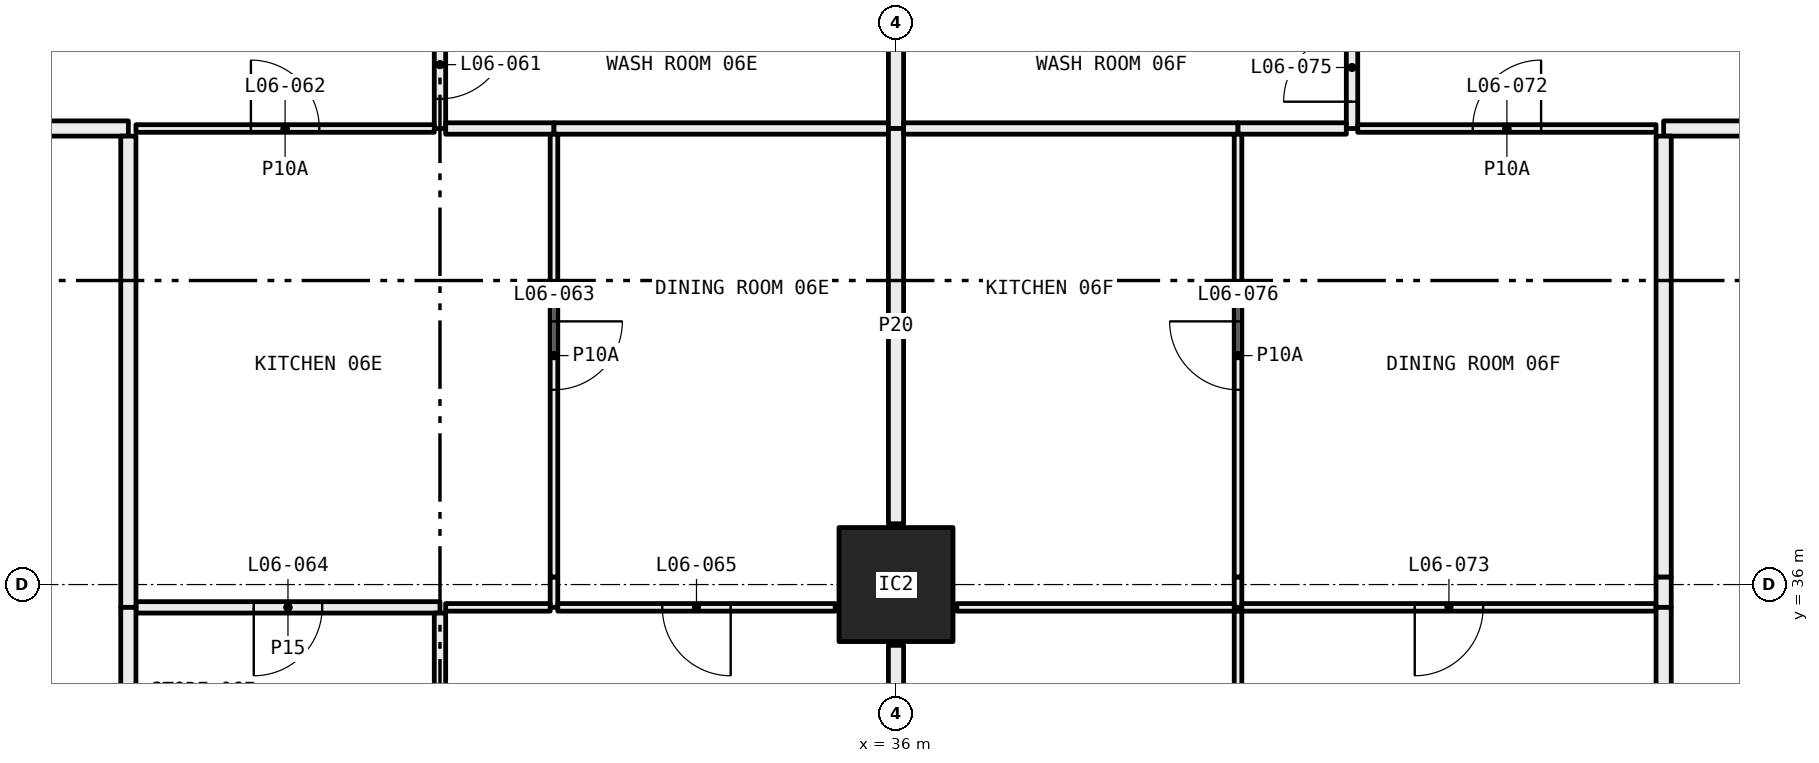
"""IFC4 building model, lengths in metres.
Left out: names, types, materials, properties, quantities, classifications, styles, units other than length and angle.
Written with IfcOpenShell. Run it as: python <this file> out.ifc"""

import sys

from ifc_helpers import new_model, si_unit, direction, frame, frame_2d, origin, origin_2d, place, context, subcontext, project, spatial, rectangle, hollow_rectangle, extrude, element, fill, save


model = new_model("IFC4")
c1 = context("Model", 3, precision=1e-05, world=origin(), true_north=direction((0.0, 1.0)))
c2 = subcontext(c1, "Body", "Model", "MODEL_VIEW")
j1 = project(units=[si_unit("LENGTHUNIT", "METRE"), si_unit("PLANEANGLEUNIT", "RADIAN")], contexts=[c1])
p1 = place(None, origin())
s1 = spatial("IfcSite", under=j1, at=p1, CompositionType="ELEMENT")
p2 = place(p1, origin())
s2 = spatial("IfcBuilding", under=s1, at=p2, CompositionType="ELEMENT")
p3 = place(p2, frame((0.0, 0.0, 33.45)))
s3 = spatial("IfcBuildingStorey", under=s2, at=p3, CompositionType="ELEMENT", Elevation=33.45)
p4 = place(p3, frame((36.0, 36.0, 0.0), z_axis=(0.0, 0.0, 1.0), x_axis=(1.0, 0.0, 0.0)))
e1 = element("IfcColumn", 1, at=p4, inside=s3, PredefinedType="COLUMN", context=c2, shape_type="SweptSolid", body=[
    extrude(hollow_rectangle(XDim=1.5, YDim=1.5, WallThickness=0.065, at=origin_2d()), origin(), (0.0, 0.0, 1.0), 3.05),
])
p5 = place(p3, frame((30.0, 42.0, 0.0), z_axis=(0.0, 0.0, 1.0), x_axis=(0.0, 1.0, 0.0)))
e2 = element("IfcWall", 2, at=p5, inside=s3, PredefinedType="PARTITIONING", context=c2, shape_type="SweptSolid", body=[
    extrude(rectangle(XDim=1.68, YDim=0.15, at=frame_2d((0.84, 0.0))), origin(), (0.0, 0.0, 1.0), 3.05),
])
p6 = place(p5, frame((0.39, 0.0, 0.0)))
e3 = element("IfcOpeningElement", 3, at=p6, cuts=e2, PredefinedType="OPENING", context=c2, shape_type="SweptSolid", body=[
    extrude(rectangle(XDim=0.9, YDim=2.1, at=frame_2d((0.45, 1.05))), frame((0.0, 0.085, 0.0), z_axis=(0.0, -1.0, 0.0), x_axis=(1.0, 0.0, 0.0)), (0.0, 0.0, 1.0), 0.17),
])
p7 = place(p3, frame((26.0, 42.0, 0.0), z_axis=(0.0, 0.0, 1.0), x_axis=(1.0, 0.0, 0.0)))
e4 = element("IfcWall", 4, at=p7, inside=s3, PredefinedType="PARTITIONING", context=c2, shape_type="SweptSolid", body=[
    extrude(rectangle(XDim=3.925, YDim=0.1, at=frame_2d((1.962, 0.0))), origin(), (0.0, 0.0, 1.0), 3.05),
])
p8 = place(p7, frame((1.512, 0.0, 0.0)))
e5 = element("IfcOpeningElement", 5, at=p8, cuts=e4, PredefinedType="OPENING", context=c2, shape_type="SweptSolid", body=[
    extrude(rectangle(XDim=0.9, YDim=2.1, at=frame_2d((0.45, 1.05))), frame((0.0, 0.06, 0.0), z_axis=(0.0, -1.0, 0.0), x_axis=(1.0, 0.0, 0.0)), (0.0, 0.0, 1.0), 0.12),
])
p9 = place(p3, frame((24.0, 42.0, 0.0), z_axis=(0.0, 0.0, 1.0), x_axis=(1.0, 0.0, 0.0)))
e6 = element("IfcWall", 6, at=p9, inside=s3, PredefinedType="PARTITIONING", context=c2, shape_type="SweptSolid", body=[
    extrude(rectangle(XDim=1.9, YDim=0.2, at=frame_2d((0.95, 0.0))), origin(), (0.0, 0.0, 1.0), 3.05),
])
p10 = place(p3, frame((30.075, 42.0, 0.0), z_axis=(0.0, 0.0, 1.0), x_axis=(1.0, 0.0, 0.0)))
e7 = element("IfcWall", 7, at=p10, inside=s3, PredefinedType="PARTITIONING", context=c2, shape_type="SweptSolid", body=[
    extrude(rectangle(XDim=1.425, YDim=0.15, at=frame_2d((0.712, 0.0))), origin(), (0.0, 0.0, 1.0), 3.05),
])
p11 = place(p3, frame((31.5, 42.0, 0.0), z_axis=(0.0, 0.0, 1.0), x_axis=(1.0, 0.0, 0.0)))
e8 = element("IfcWall", 8, at=p11, inside=s3, PredefinedType="PARTITIONING", context=c2, shape_type="SweptSolid", body=[
    extrude(rectangle(XDim=4.4, YDim=0.15, at=frame_2d((2.2, 0.0))), origin(), (0.0, 0.0, 1.0), 3.05),
])
p12 = place(p3, frame((36.0, 42.0, 0.0), z_axis=(0.0, 0.0, 1.0), x_axis=(0.0, 1.0, 0.0)))
e9 = element("IfcWall", 9, at=p12, inside=s3, PredefinedType="PARTITIONING", context=c2, shape_type="SweptSolid", body=[
    extrude(rectangle(XDim=1.68, YDim=0.2, at=frame_2d((0.84, 0.0))), origin(), (0.0, 0.0, 1.0), 2.45),
])
p13 = place(p3, frame((31.5, 35.7, 0.0), z_axis=(0.0, 0.0, 1.0), x_axis=(0.0, 1.0, 0.0)))
e10 = element("IfcWall", 10, at=p13, inside=s3, PredefinedType="PARTITIONING", context=c2, shape_type="SweptSolid", body=[
    extrude(rectangle(XDim=0.4, YDim=0.1, at=frame_2d((0.2, 0.0))), origin(), (0.0, 0.0, 1.0), 2.45),
])
p14 = place(p3, frame((31.5, 36.1, 0.0), z_axis=(0.0, 0.0, 1.0), x_axis=(0.0, 1.0, 0.0)))
e11 = element("IfcWall", 11, at=p14, inside=s3, PredefinedType="PARTITIONING", context=c2, shape_type="SweptSolid", body=[
    extrude(rectangle(XDim=5.825, YDim=0.1, at=frame_2d((2.913, 0.0))), origin(), (0.0, 0.0, 1.0), 3.05),
])
p15 = place(p14, frame((2.462, 0.0, 0.0)))
e12 = element("IfcOpeningElement", 12, at=p15, cuts=e11, PredefinedType="OPENING", context=c2, shape_type="SweptSolid", body=[
    extrude(rectangle(XDim=0.9, YDim=2.1, at=frame_2d((0.45, 1.05))), frame((0.0, 0.06, 0.0), z_axis=(0.0, -1.0, 0.0), x_axis=(1.0, 0.0, 0.0)), (0.0, 0.0, 1.0), 0.12),
])
p16 = place(p3, frame((26.0, 35.7, 0.0), z_axis=(0.0, 0.0, 1.0), x_axis=(1.0, 0.0, 0.0)))
e13 = element("IfcWall", 13, at=p16, inside=s3, PredefinedType="PARTITIONING", context=c2, shape_type="SweptSolid", body=[
    extrude(rectangle(XDim=4.0, YDim=0.15, at=frame_2d((2.0, 0.0))), origin(), (0.0, 0.0, 1.0), 3.05),
])
p17 = place(p16, frame((1.55, 0.0, 0.0)))
e14 = element("IfcOpeningElement", 14, at=p17, cuts=e13, PredefinedType="OPENING", context=c2, shape_type="SweptSolid", body=[
    extrude(rectangle(XDim=0.9, YDim=2.1, at=frame_2d((0.45, 1.05))), frame((0.0, 0.085, 0.0), z_axis=(0.0, -1.0, 0.0), x_axis=(1.0, 0.0, 0.0)), (0.0, 0.0, 1.0), 0.17),
])
p18 = place(p3, frame((30.075, 35.7, 0.0), z_axis=(0.0, 0.0, 1.0), x_axis=(1.0, 0.0, 0.0)))
e15 = element("IfcWall", 15, at=p18, inside=s3, PredefinedType="PARTITIONING", context=c2, shape_type="SweptSolid", body=[
    extrude(rectangle(XDim=1.375, YDim=0.1, at=frame_2d((0.688, 0.0))), origin(), (0.0, 0.0, 1.0), 3.05),
])
p19 = place(p3, frame((25.9, 41.9, 0.0), z_axis=(0.0, 0.0, 1.0), x_axis=(0.0, -1.0, 0.0)))
e16 = element("IfcWall", 16, at=p19, inside=s3, PredefinedType="PARTITIONING", context=c2, shape_type="SweptSolid", body=[
    extrude(rectangle(XDim=6.2, YDim=0.2, at=frame_2d((3.1, 0.0))), origin(), (0.0, 0.0, 1.0), 2.45),
])
p20 = place(p3, frame((31.55, 35.7, 0.0), z_axis=(0.0, 0.0, 1.0), x_axis=(1.0, 0.0, 0.0)))
e17 = element("IfcWall", 17, at=p20, inside=s3, PredefinedType="PARTITIONING", context=c2, shape_type="SweptSolid", body=[
    extrude(rectangle(XDim=3.65, YDim=0.1, at=frame_2d((1.825, 0.0))), origin(), (0.0, 0.0, 1.0), 3.05),
])
p21 = place(p20, frame((1.375, 0.0, 0.0)))
e18 = element("IfcOpeningElement", 18, at=p21, cuts=e17, PredefinedType="OPENING", context=c2, shape_type="SweptSolid", body=[
    extrude(rectangle(XDim=0.9, YDim=2.1, at=frame_2d((0.45, 1.05))), frame((0.0, 0.06, 0.0), z_axis=(0.0, -1.0, 0.0), x_axis=(1.0, 0.0, 0.0)), (0.0, 0.0, 1.0), 0.12),
])
p22 = place(p3, frame((36.0, 36.8, 0.0), z_axis=(0.0, 0.0, 1.0), x_axis=(0.0, 1.0, 0.0)))
e19 = element("IfcWall", 19, at=p22, inside=s3, PredefinedType="PARTITIONING", context=c2, shape_type="SweptSolid", body=[
    extrude(rectangle(XDim=5.2, YDim=0.2, at=frame_2d((2.6, 0.0))), origin(), (0.0, 0.0, 1.0), 2.45),
])
p23 = place(p3, frame((30.0, 33.675, 0.0), z_axis=(0.0, 0.0, 1.0), x_axis=(0.0, 1.0, 0.0)))
e20 = element("IfcWall", 20, at=p23, inside=s3, PredefinedType="PARTITIONING", context=c2, shape_type="SweptSolid", body=[
    extrude(rectangle(XDim=1.95, YDim=0.15, at=frame_2d((0.975, 0.0))), origin(), (0.0, 0.0, 1.0), 3.05),
])
p24 = place(p3, frame((25.9, 35.7, 0.0), z_axis=(0.0, 0.0, 1.0), x_axis=(0.0, -1.0, 0.0)))
e21 = element("IfcWall", 21, at=p24, inside=s3, PredefinedType="PARTITIONING", context=c2, shape_type="SweptSolid", body=[
    extrude(rectangle(XDim=2.1, YDim=0.2, at=frame_2d((1.05, 0.0))), origin(), (0.0, 0.0, 1.0), 3.05),
])
p25 = place(p3, frame((36.0, 31.2, 0.0), z_axis=(0.0, 0.0, 1.0), x_axis=(0.0, 1.0, 0.0)))
e22 = element("IfcWall", 22, at=p25, inside=s3, PredefinedType="PARTITIONING", context=c2, shape_type="SweptSolid", body=[
    extrude(rectangle(XDim=4.0, YDim=0.2, at=frame_2d((2.0, 0.0))), origin(), (0.0, 0.0, 1.0), 2.45),
])
p26 = place(p3, frame((42.0, 42.0, 0.0), z_axis=(0.0, 0.0, 1.0), x_axis=(0.0, 1.0, 0.0)))
e23 = element("IfcWall", 23, at=p26, inside=s3, PredefinedType="PARTITIONING", context=c2, shape_type="SweptSolid", body=[
    extrude(rectangle(XDim=1.605, YDim=0.15, at=frame_2d((0.802, 0.0))), origin(), (0.0, 0.0, 1.0), 3.05),
])
p27 = place(p26, frame((0.353, 0.0, 0.0)))
e24 = element("IfcOpeningElement", 24, at=p27, cuts=e23, PredefinedType="OPENING", context=c2, shape_type="SweptSolid", body=[
    extrude(rectangle(XDim=0.9, YDim=2.1, at=frame_2d((0.45, 1.05))), frame((0.0, 0.085, 0.0), z_axis=(0.0, -1.0, 0.0), x_axis=(1.0, 0.0, 0.0)), (0.0, 0.0, 1.0), 0.17),
])
p28 = place(p3, frame((36.1, 42.0, 0.0), z_axis=(0.0, 0.0, 1.0), x_axis=(1.0, 0.0, 0.0)))
e25 = element("IfcWall", 25, at=p28, inside=s3, PredefinedType="PARTITIONING", context=c2, shape_type="SweptSolid", body=[
    extrude(rectangle(XDim=4.4, YDim=0.15, at=frame_2d((2.2, 0.0))), origin(), (0.0, 0.0, 1.0), 3.05),
])
p29 = place(p3, frame((40.5, 42.0, 0.0), z_axis=(0.0, 0.0, 1.0), x_axis=(1.0, 0.0, 0.0)))
e26 = element("IfcWall", 26, at=p29, inside=s3, PredefinedType="PARTITIONING", context=c2, shape_type="SweptSolid", body=[
    extrude(rectangle(XDim=1.425, YDim=0.15, at=frame_2d((0.712, 0.0))), origin(), (0.0, 0.0, 1.0), 3.05),
])
p30 = place(p3, frame((42.075, 42.0, 0.0), z_axis=(0.0, 0.0, 1.0), x_axis=(1.0, 0.0, 0.0)))
e27 = element("IfcWall", 27, at=p30, inside=s3, PredefinedType="PARTITIONING", context=c2, shape_type="SweptSolid", body=[
    extrude(rectangle(XDim=3.925, YDim=0.1, at=frame_2d((1.962, 0.0))), origin(), (0.0, 0.0, 1.0), 3.05),
])
p31 = place(p30, frame((1.512, 0.0, 0.0)))
e28 = element("IfcOpeningElement", 28, at=p31, cuts=e27, PredefinedType="OPENING", context=c2, shape_type="SweptSolid", body=[
    extrude(rectangle(XDim=0.9, YDim=2.1, at=frame_2d((0.45, 1.05))), frame((0.0, 0.06, 0.0), z_axis=(0.0, -1.0, 0.0), x_axis=(1.0, 0.0, 0.0)), (0.0, 0.0, 1.0), 0.12),
])
p32 = place(p3, frame((46.1, 42.0, 0.0), z_axis=(0.0, 0.0, 1.0), x_axis=(1.0, 0.0, 0.0)))
e29 = element("IfcWall", 29, at=p32, inside=s3, PredefinedType="PARTITIONING", context=c2, shape_type="SweptSolid", body=[
    extrude(rectangle(XDim=1.9, YDim=0.2, at=frame_2d((0.95, 0.0))), origin(), (0.0, 0.0, 1.0), 3.05),
])
p33 = place(p3, frame((40.5, 35.7, 0.0), z_axis=(0.0, 0.0, 1.0), x_axis=(0.0, 1.0, 0.0)))
e30 = element("IfcWall", 30, at=p33, inside=s3, PredefinedType="PARTITIONING", context=c2, shape_type="SweptSolid", body=[
    extrude(rectangle(XDim=0.4, YDim=0.1, at=frame_2d((0.2, 0.0))), origin(), (0.0, 0.0, 1.0), 2.45),
])
p34 = place(p3, frame((40.5, 36.1, 0.0), z_axis=(0.0, 0.0, 1.0), x_axis=(0.0, 1.0, 0.0)))
e31 = element("IfcWall", 31, at=p34, inside=s3, PredefinedType="PARTITIONING", context=c2, shape_type="SweptSolid", body=[
    extrude(rectangle(XDim=5.825, YDim=0.1, at=frame_2d((2.913, 0.0))), origin(), (0.0, 0.0, 1.0), 3.05),
])
p35 = place(p34, frame((2.462, 0.0, 0.0)))
e32 = element("IfcOpeningElement", 32, at=p35, cuts=e31, PredefinedType="OPENING", context=c2, shape_type="SweptSolid", body=[
    extrude(rectangle(XDim=0.9, YDim=2.1, at=frame_2d((0.45, 1.05))), frame((0.0, 0.06, 0.0), z_axis=(0.0, -1.0, 0.0), x_axis=(1.0, 0.0, 0.0)), (0.0, 0.0, 1.0), 0.12),
])
p36 = place(p3, frame((36.8, 35.7, 0.0), z_axis=(0.0, 0.0, 1.0), x_axis=(1.0, 0.0, 0.0)))
e33 = element("IfcWall", 33, at=p36, inside=s3, PredefinedType="PARTITIONING", context=c2, shape_type="SweptSolid", body=[
    extrude(rectangle(XDim=3.65, YDim=0.1, at=frame_2d((1.825, 0.0))), origin(), (0.0, 0.0, 1.0), 3.05),
])
p37 = place(p3, frame((40.55, 35.7, 0.0), z_axis=(0.0, 0.0, 1.0), x_axis=(1.0, 0.0, 0.0)))
e34 = element("IfcWall", 34, at=p37, inside=s3, PredefinedType="PARTITIONING", context=c2, shape_type="SweptSolid", body=[
    extrude(rectangle(XDim=5.45, YDim=0.1, at=frame_2d((2.725, 0.0))), origin(), (0.0, 0.0, 1.0), 3.05),
])
p38 = place(p37, frame((2.275, 0.0, 0.0)))
e35 = element("IfcOpeningElement", 35, at=p38, cuts=e34, PredefinedType="OPENING", context=c2, shape_type="SweptSolid", body=[
    extrude(rectangle(XDim=0.9, YDim=2.1, at=frame_2d((0.45, 1.05))), frame((0.0, 0.06, 0.0), z_axis=(0.0, -1.0, 0.0), x_axis=(1.0, 0.0, 0.0)), (0.0, 0.0, 1.0), 0.12),
])
p39 = place(p3, frame((46.1, 35.7, 0.0), z_axis=(0.0, 0.0, 1.0), x_axis=(0.0, 1.0, 0.0)))
e36 = element("IfcWall", 36, at=p39, inside=s3, PredefinedType="PARTITIONING", context=c2, shape_type="SweptSolid", body=[
    extrude(rectangle(XDim=0.4, YDim=0.2, at=frame_2d((0.2, 0.0))), origin(), (0.0, 0.0, 1.0), 2.45),
])
p40 = place(p3, frame((46.1, 36.1, 0.0), z_axis=(0.0, 0.0, 1.0), x_axis=(0.0, 1.0, 0.0)))
e37 = element("IfcWall", 37, at=p40, inside=s3, PredefinedType="PARTITIONING", context=c2, shape_type="SweptSolid", body=[
    extrude(rectangle(XDim=5.8, YDim=0.2, at=frame_2d((2.9, 0.0))), origin(), (0.0, 0.0, 1.0), 3.05),
])
p41 = place(p3, frame((40.5, 31.3, 0.0), z_axis=(0.0, 0.0, 1.0), x_axis=(0.0, 1.0, 0.0)))
e38 = element("IfcWall", 38, at=p41, inside=s3, PredefinedType="PARTITIONING", context=c2, shape_type="SweptSolid", body=[
    extrude(rectangle(XDim=4.35, YDim=0.1, at=frame_2d((2.175, 0.0))), origin(), (0.0, 0.0, 1.0), 3.05),
])
p42 = place(p41, frame((1.725, 0.0, 0.0)))
e39 = element("IfcOpeningElement", 39, at=p42, cuts=e38, PredefinedType="OPENING", context=c2, shape_type="SweptSolid", body=[
    extrude(rectangle(XDim=0.9, YDim=2.1, at=frame_2d((0.45, 1.05))), frame((0.0, 0.06, 0.0), z_axis=(0.0, -1.0, 0.0), x_axis=(1.0, 0.0, 0.0)), (0.0, 0.0, 1.0), 0.12),
])
p43 = place(p3, frame((46.1, 31.3, 0.0), z_axis=(0.0, 0.0, 1.0), x_axis=(0.0, 1.0, 0.0)))
e40 = element("IfcWall", 40, at=p43, inside=s3, PredefinedType="PARTITIONING", context=c2, shape_type="SweptSolid", body=[
    extrude(rectangle(XDim=4.4, YDim=0.2, at=frame_2d((2.2, 0.0))), origin(), (0.0, 0.0, 1.0), 3.05),
])
p44 = place(p6, frame((0.9, 0.0, 0.0), x_axis=(-1.0, 0.0, 0.0)))
e41 = element("IfcDoor", 41, at=p44, inside=s3, OperationType="SINGLE_SWING_RIGHT", PredefinedType="DOOR", context=c2, shape_type="SweptSolid", body=[
    extrude(rectangle(XDim=0.9, YDim=2.1, at=frame_2d((0.45, 1.05))), frame((0.0, 0.025, 0.0), z_axis=(0.0, -1.0, 0.0), x_axis=(1.0, 0.0, 0.0)), (0.0, 0.0, 1.0), 0.05),
])
fill(e3, e41)
p45 = place(p8, origin())
e42 = element("IfcDoor", 42, at=p45, inside=s3, OperationType="SINGLE_SWING_RIGHT", PredefinedType="DOOR", context=c2, shape_type="SweptSolid", body=[
    extrude(rectangle(XDim=0.9, YDim=2.1, at=frame_2d((0.45, 1.05))), frame((0.0, 0.025, 0.0), z_axis=(0.0, -1.0, 0.0), x_axis=(1.0, 0.0, 0.0)), (0.0, 0.0, 1.0), 0.05),
])
fill(e5, e42)
p46 = place(p15, frame((0.9, 0.0, 0.0), x_axis=(-1.0, 0.0, 0.0)))
e43 = element("IfcDoor", 43, at=p46, inside=s3, OperationType="SINGLE_SWING_RIGHT", PredefinedType="DOOR", context=c2, shape_type="SweptSolid", body=[
    extrude(rectangle(XDim=0.9, YDim=2.1, at=frame_2d((0.45, 1.05))), frame((0.0, 0.025, 0.0), z_axis=(0.0, -1.0, 0.0), x_axis=(1.0, 0.0, 0.0)), (0.0, 0.0, 1.0), 0.05),
])
fill(e12, e43)
p47 = place(p17, frame((0.9, 0.0, 0.0), x_axis=(-1.0, 0.0, 0.0)))
e44 = element("IfcDoor", 44, at=p47, inside=s3, OperationType="SINGLE_SWING_LEFT", PredefinedType="DOOR", context=c2, shape_type="SweptSolid", body=[
    extrude(rectangle(XDim=0.9, YDim=2.1, at=frame_2d((0.45, 1.05))), frame((0.0, 0.025, 0.0), z_axis=(0.0, -1.0, 0.0), x_axis=(1.0, 0.0, 0.0)), (0.0, 0.0, 1.0), 0.05),
])
fill(e14, e44)
p48 = place(p21, frame((0.9, 0.0, 0.0), x_axis=(-1.0, 0.0, 0.0)))
e45 = element("IfcDoor", 45, at=p48, inside=s3, OperationType="SINGLE_SWING_RIGHT", PredefinedType="DOOR", context=c2, shape_type="SweptSolid", body=[
    extrude(rectangle(XDim=0.9, YDim=2.1, at=frame_2d((0.45, 1.05))), frame((0.0, 0.025, 0.0), z_axis=(0.0, -1.0, 0.0), x_axis=(1.0, 0.0, 0.0)), (0.0, 0.0, 1.0), 0.05),
])
fill(e18, e45)
p49 = place(p31, origin())
e46 = element("IfcDoor", 46, at=p49, inside=s3, OperationType="SINGLE_SWING_LEFT", PredefinedType="DOOR", context=c2, shape_type="SweptSolid", body=[
    extrude(rectangle(XDim=0.9, YDim=2.1, at=frame_2d((0.45, 1.05))), frame((0.0, 0.025, 0.0), z_axis=(0.0, -1.0, 0.0), x_axis=(1.0, 0.0, 0.0)), (0.0, 0.0, 1.0), 0.05),
])
fill(e28, e46)
p50 = place(p38, frame((0.9, 0.0, 0.0), x_axis=(-1.0, 0.0, 0.0)))
e47 = element("IfcDoor", 47, at=p50, inside=s3, OperationType="SINGLE_SWING_LEFT", PredefinedType="DOOR", context=c2, shape_type="SweptSolid", body=[
    extrude(rectangle(XDim=0.9, YDim=2.1, at=frame_2d((0.45, 1.05))), frame((0.0, 0.025, 0.0), z_axis=(0.0, -1.0, 0.0), x_axis=(1.0, 0.0, 0.0)), (0.0, 0.0, 1.0), 0.05),
])
fill(e35, e47)
p51 = place(p27, origin())
e48 = element("IfcDoor", 48, at=p51, inside=s3, OperationType="SINGLE_SWING_RIGHT", PredefinedType="DOOR", context=c2, shape_type="SweptSolid", body=[
    extrude(rectangle(XDim=0.9, YDim=2.1, at=frame_2d((0.45, 1.05))), frame((0.0, 0.025, 0.0), z_axis=(0.0, -1.0, 0.0), x_axis=(1.0, 0.0, 0.0)), (0.0, 0.0, 1.0), 0.05),
])
fill(e24, e48)
p52 = place(p35, origin())
e49 = element("IfcDoor", 49, at=p52, inside=s3, OperationType="SINGLE_SWING_LEFT", PredefinedType="DOOR", context=c2, shape_type="SweptSolid", body=[
    extrude(rectangle(XDim=0.9, YDim=2.1, at=frame_2d((0.45, 1.05))), frame((0.0, 0.025, 0.0), z_axis=(0.0, -1.0, 0.0), x_axis=(1.0, 0.0, 0.0)), (0.0, 0.0, 1.0), 0.05),
])
fill(e32, e49)
save(model, sys.argv[1])
